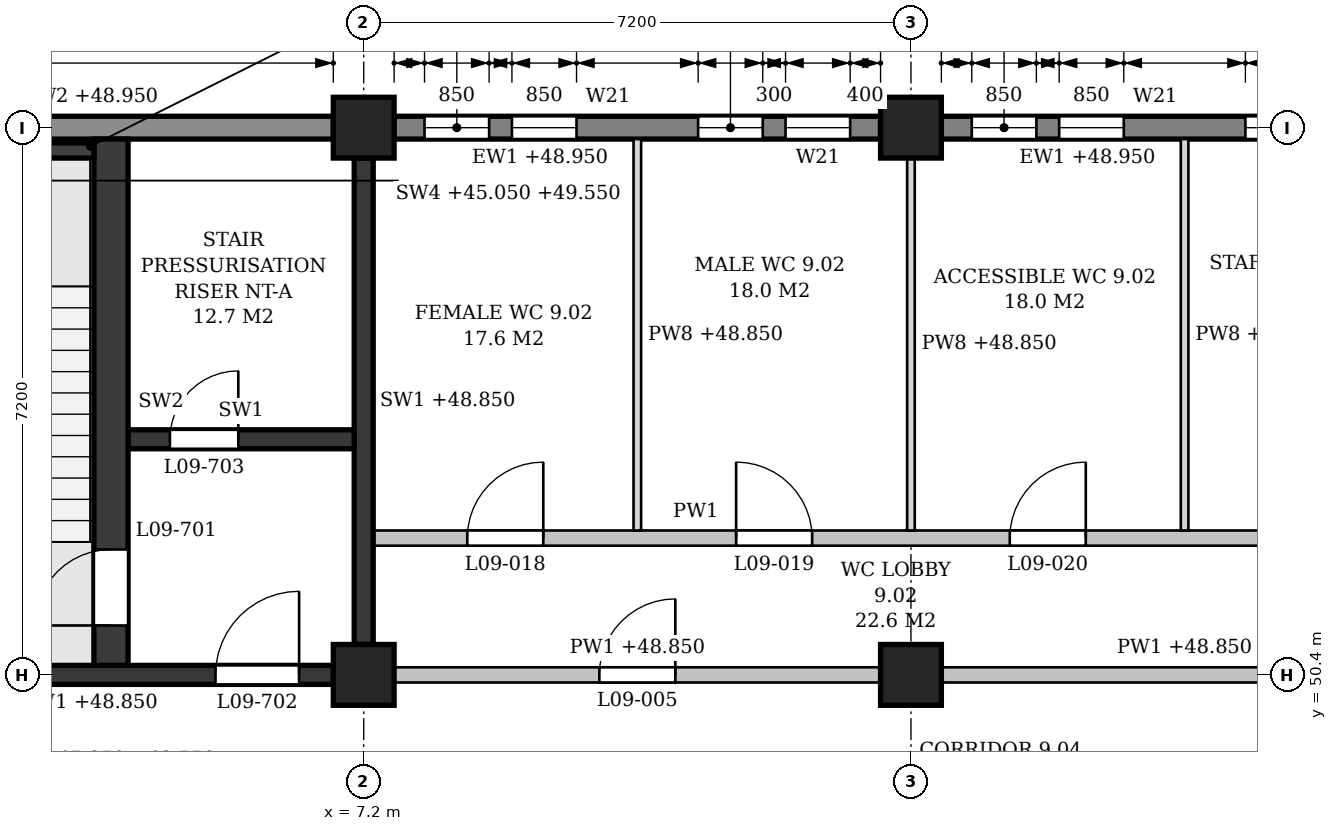
"""IFC4 building model, lengths in metres.
Left out: names, types, materials, properties, quantities, classifications, styles, units other than length and angle.
Written with IfcOpenShell. Run it as: python <this file> out.ifc"""

import sys

from ifc_helpers import new_model, si_unit, direction, frame, frame_2d, origin, origin_2d, place, context, subcontext, project, spatial, polyline, rectangle, outline, extrude, element, fill, save


model = new_model("IFC4")
c1 = context("Model", 3, precision=1e-05, world=origin(), true_north=direction((0.0, 1.0)))
c2 = subcontext(c1, "Body", "Model", "MODEL_VIEW")
j1 = project(units=[si_unit("LENGTHUNIT", "METRE"), si_unit("PLANEANGLEUNIT", "RADIAN")], contexts=[c1])
p1 = place(None, origin())
s1 = spatial("IfcSite", under=j1, at=p1, CompositionType="ELEMENT")
p2 = place(p1, origin())
s2 = spatial("IfcBuilding", under=s1, at=p2, CompositionType="ELEMENT")
p3 = place(p2, frame((0.0, 0.0, 45.3)))
s3 = spatial("IfcBuildingStorey", under=s2, at=p3, CompositionType="ELEMENT", Elevation=45.3)
for number, where, z_axis, x_axis in (
    (1, (7.2, 50.4, 0.0), (0.0, 0.0, 1.0), (1.0, 0.0, 0.0)),
    (2, (7.2, 57.6, 0.0), (0.0, 0.0, 1.0), (1.0, 0.0, 0.0)),
    (3, (14.4, 50.4, 0.0), (0.0, 0.0, 1.0), (1.0, 0.0, 0.0)),
    (4, (14.4, 57.6, 0.0), (0.0, 0.0, 1.0), (1.0, 0.0, 0.0)),
):
    element("IfcColumn", number, at=place(p3, frame(where, z_axis=z_axis, x_axis=x_axis)), inside=s3, PredefinedType="COLUMN", context=c2, shape_type="SweptSolid", body=[
        extrude(rectangle(XDim=0.8, YDim=0.8, at=origin_2d()), origin(), (0.0, 0.0, 1.0), 4.5),
    ])
p4 = place(p3, frame((21.2, 57.6, 0.0), z_axis=(0.0, 0.0, 1.0), x_axis=(-1.0, 0.0, 0.0)))
e5 = element("IfcWall", 5, at=p4, inside=s3, PredefinedType="STANDARD", context=c2, shape_type="SweptSolid", body=[
    extrude(rectangle(XDim=6.4, YDim=0.3, at=frame_2d((3.2, 0.0))), origin(), (0.0, 0.0, 1.0), 3.65),
])
p5 = place(p4, frame((0.4, 0.0, 0.9)))
e6 = element("IfcOpeningElement", 6, at=p5, cuts=e5, PredefinedType="OPENING", context=c2, shape_type="SweptSolid", body=[
    extrude(outline(polyline([(0.0, 0.0), (0.85, 0.0), (0.85, 2.25), (0.425, 2.7), (0.0, 2.25), (0.0, 0.0)])), frame((0.0, 0.16, 0.0), z_axis=(0.0, -1.0, 0.0), x_axis=(1.0, 0.0, 0.0)), (0.0, 0.0, 1.0), 0.32),
])
p6 = place(p4, frame((1.55, 0.0, 0.9)))
e7 = element("IfcOpeningElement", 7, at=p6, cuts=e5, PredefinedType="OPENING", context=c2, shape_type="SweptSolid", body=[
    extrude(outline(polyline([(0.0, 0.0), (0.85, 0.0), (0.85, 2.25), (0.425, 2.7), (0.0, 2.25), (0.0, 0.0)])), frame((0.0, 0.16, 0.0), z_axis=(0.0, -1.0, 0.0), x_axis=(1.0, 0.0, 0.0)), (0.0, 0.0, 1.0), 0.32),
])
p7 = place(p4, frame((4.0, 0.0, 0.9)))
e8 = element("IfcOpeningElement", 8, at=p7, cuts=e5, PredefinedType="OPENING", context=c2, shape_type="SweptSolid", body=[
    extrude(outline(polyline([(0.0, 0.0), (0.85, 0.0), (0.85, 2.25), (0.425, 2.7), (0.0, 2.25), (0.0, 0.0)])), frame((0.0, 0.16, 0.0), z_axis=(0.0, -1.0, 0.0), x_axis=(1.0, 0.0, 0.0)), (0.0, 0.0, 1.0), 0.32),
])
p8 = place(p4, frame((5.15, 0.0, 0.9)))
e9 = element("IfcOpeningElement", 9, at=p8, cuts=e5, PredefinedType="OPENING", context=c2, shape_type="SweptSolid", body=[
    extrude(outline(polyline([(0.0, 0.0), (0.85, 0.0), (0.85, 2.25), (0.425, 2.7), (0.0, 2.25), (0.0, 0.0)])), frame((0.0, 0.16, 0.0), z_axis=(0.0, -1.0, 0.0), x_axis=(1.0, 0.0, 0.0)), (0.0, 0.0, 1.0), 0.32),
])
p9 = place(p3, frame((14.0, 57.6, 0.0), z_axis=(0.0, 0.0, 1.0), x_axis=(-1.0, 0.0, 0.0)))
e10 = element("IfcWall", 10, at=p9, inside=s3, PredefinedType="STANDARD", context=c2, shape_type="SweptSolid", body=[
    extrude(rectangle(XDim=6.4, YDim=0.3, at=frame_2d((3.2, 0.0))), origin(), (0.0, 0.0, 1.0), 3.65),
])
p10 = place(p9, frame((0.4, 0.0, 0.9)))
e11 = element("IfcOpeningElement", 11, at=p10, cuts=e10, PredefinedType="OPENING", context=c2, shape_type="SweptSolid", body=[
    extrude(outline(polyline([(0.0, 0.0), (0.85, 0.0), (0.85, 2.25), (0.425, 2.7), (0.0, 2.25), (0.0, 0.0)])), frame((0.0, 0.16, 0.0), z_axis=(0.0, -1.0, 0.0), x_axis=(1.0, 0.0, 0.0)), (0.0, 0.0, 1.0), 0.32),
])
p11 = place(p9, frame((1.55, 0.0, 0.9)))
e12 = element("IfcOpeningElement", 12, at=p11, cuts=e10, PredefinedType="OPENING", context=c2, shape_type="SweptSolid", body=[
    extrude(outline(polyline([(0.0, 0.0), (0.85, 0.0), (0.85, 2.25), (0.425, 2.7), (0.0, 2.25), (0.0, 0.0)])), frame((0.0, 0.16, 0.0), z_axis=(0.0, -1.0, 0.0), x_axis=(1.0, 0.0, 0.0)), (0.0, 0.0, 1.0), 0.32),
])
p12 = place(p9, frame((4.0, 0.0, 0.9)))
e13 = element("IfcOpeningElement", 13, at=p12, cuts=e10, PredefinedType="OPENING", context=c2, shape_type="SweptSolid", body=[
    extrude(outline(polyline([(0.0, 0.0), (0.85, 0.0), (0.85, 2.25), (0.425, 2.7), (0.0, 2.25), (0.0, 0.0)])), frame((0.0, 0.16, 0.0), z_axis=(0.0, -1.0, 0.0), x_axis=(1.0, 0.0, 0.0)), (0.0, 0.0, 1.0), 0.32),
])
p13 = place(p9, frame((5.15, 0.0, 0.9)))
e14 = element("IfcOpeningElement", 14, at=p13, cuts=e10, PredefinedType="OPENING", context=c2, shape_type="SweptSolid", body=[
    extrude(outline(polyline([(0.0, 0.0), (0.85, 0.0), (0.85, 2.25), (0.425, 2.7), (0.0, 2.25), (0.0, 0.0)])), frame((0.0, 0.16, 0.0), z_axis=(0.0, -1.0, 0.0), x_axis=(1.0, 0.0, 0.0)), (0.0, 0.0, 1.0), 0.32),
])
p14 = place(p3, frame((6.8, 57.6, 0.0), z_axis=(0.0, 0.0, 1.0), x_axis=(-1.0, 0.0, 0.0)))
e15 = element("IfcWall", 15, at=p14, inside=s3, PredefinedType="STANDARD", context=c2, shape_type="SweptSolid", body=[
    extrude(rectangle(XDim=6.4, YDim=0.3, at=frame_2d((3.2, 0.0))), origin(), (0.0, 0.0, 1.0), 3.65),
])
p15 = place(p14, frame((4.55, 0.0, 0.9)))
e16 = element("IfcOpeningElement", 16, at=p15, cuts=e15, PredefinedType="OPENING", context=c2, shape_type="SweptSolid", body=[
    extrude(outline(polyline([(0.0, 0.0), (0.9, 0.0), (0.9, 2.25), (0.45, 2.7), (0.0, 2.25), (0.0, 0.0)])), frame((0.0, 0.16, 0.0), z_axis=(0.0, -1.0, 0.0), x_axis=(1.0, 0.0, 0.0)), (0.0, 0.0, 1.0), 0.32),
])
p16 = place(p3, frame((0.4, 50.4, 0.0), z_axis=(0.0, 0.0, 1.0), x_axis=(1.0, 0.0, 0.0)))
e17 = element("IfcWall", 17, at=p16, inside=s3, PredefinedType="SHEAR", context=c2, shape_type="SweptSolid", body=[
    extrude(rectangle(XDim=6.4, YDim=0.25, at=frame_2d((3.2, 0.0))), origin(), (0.0, 0.0, 1.0), 3.55),
])
p17 = place(p16, frame((4.85, 0.0, 0.0)))
e18 = element("IfcOpeningElement", 18, at=p17, cuts=e17, PredefinedType="OPENING", context=c2, shape_type="SweptSolid", body=[
    extrude(rectangle(XDim=1.1, YDim=2.1, at=frame_2d((0.55, 1.05))), frame((0.0, 0.135, 0.0), z_axis=(0.0, -1.0, 0.0), x_axis=(1.0, 0.0, 0.0)), (0.0, 0.0, 1.0), 0.27),
])
p18 = place(p3, frame((7.2, 50.8, 0.0), z_axis=(0.0, 0.0, 1.0), x_axis=(0.0, 1.0, 0.0)))
e19 = element("IfcWall", 19, at=p18, inside=s3, PredefinedType="SHEAR", context=c2, shape_type="SweptSolid", body=[
    extrude(rectangle(XDim=6.4, YDim=0.25, at=frame_2d((3.2, 0.0))), origin(), (0.0, 0.0, 1.0), 3.55),
])
p19 = place(p3, frame((2.25, 57.3, -0.25), z_axis=(0.0, 0.0, 1.0), x_axis=(1.0, 0.0, 0.0)))
e20 = element("IfcWall", 20, at=p19, inside=s3, PredefinedType="SHEAR", context=c2, shape_type="SweptSolid", body=[
    extrude(rectangle(XDim=1.4, YDim=0.2, at=frame_2d((0.7, 0.0))), origin(), (0.0, 0.0, 1.0), 4.5),
])
p20 = place(p3, frame((3.875, 50.525, 0.0), z_axis=(0.0, 0.0, 1.0), x_axis=(0.0, 1.0, 0.0)))
e21 = element("IfcWall", 21, at=p20, inside=s3, PredefinedType="SHEAR", context=c2, shape_type="SweptSolid", body=[
    extrude(rectangle(XDim=6.925, YDim=0.45, at=frame_2d((3.462, 0.0))), origin(), (0.0, 0.0, 1.0), 4.25),
])
p21 = place(p20, frame((0.525, 0.0, 0.0)))
e22 = element("IfcOpeningElement", 22, at=p21, cuts=e21, PredefinedType="OPENING", context=c2, shape_type="SweptSolid", body=[
    extrude(rectangle(XDim=1.0, YDim=2.1, at=frame_2d((0.5, 1.05))), frame((0.0, 0.235, 0.0), z_axis=(0.0, -1.0, 0.0), x_axis=(1.0, 0.0, 0.0)), (0.0, 0.0, 1.0), 0.47),
])
p22 = place(p3, frame((4.1, 53.5, 0.0), z_axis=(0.0, 0.0, 1.0), x_axis=(1.0, 0.0, 0.0)))
e23 = element("IfcWall", 23, at=p22, inside=s3, PredefinedType="SHEAR", context=c2, shape_type="SweptSolid", body=[
    extrude(rectangle(XDim=2.975, YDim=0.25, at=frame_2d((1.487, 0.0))), origin(), (0.0, 0.0, 1.0), 4.25),
])
p23 = place(p22, frame((0.55, 0.0, 0.0)))
e24 = element("IfcOpeningElement", 24, at=p23, cuts=e23, PredefinedType="OPENING", context=c2, shape_type="SweptSolid", body=[
    extrude(rectangle(XDim=0.9, YDim=2.1, at=frame_2d((0.45, 1.05))), frame((0.0, 0.135, 0.0), z_axis=(0.0, -1.0, 0.0), x_axis=(1.0, 0.0, 0.0)), (0.0, 0.0, 1.0), 0.27),
])
p24 = place(p3, frame((7.6, 50.4, 0.0), z_axis=(0.0, 0.0, 1.0), x_axis=(1.0, 0.0, 0.0)))
e25 = element("IfcWall", 25, at=p24, inside=s3, PredefinedType="PARTITIONING", context=c2, shape_type="SweptSolid", body=[
    extrude(rectangle(XDim=6.4, YDim=0.2, at=frame_2d((3.2, 0.0))), origin(), (0.0, 0.0, 1.0), 3.55),
])
p25 = place(p24, frame((2.7, 0.0, 0.0)))
e26 = element("IfcOpeningElement", 26, at=p25, cuts=e25, PredefinedType="OPENING", context=c2, shape_type="SweptSolid", body=[
    extrude(rectangle(XDim=1.0, YDim=2.1, at=frame_2d((0.5, 1.05))), frame((0.0, 0.11, 0.0), z_axis=(0.0, -1.0, 0.0), x_axis=(1.0, 0.0, 0.0)), (0.0, 0.0, 1.0), 0.22),
])
p26 = place(p3, frame((14.8, 50.4, 0.0), z_axis=(0.0, 0.0, 1.0), x_axis=(1.0, 0.0, 0.0)))
e27 = element("IfcWall", 27, at=p26, inside=s3, PredefinedType="PARTITIONING", context=c2, shape_type="SweptSolid", body=[
    extrude(rectangle(XDim=6.4, YDim=0.2, at=frame_2d((3.2, 0.0))), origin(), (0.0, 0.0, 1.0), 3.55),
])
p27 = place(p26, frame((4.3, 0.0, 0.0)))
e28 = element("IfcOpeningElement", 28, at=p27, cuts=e27, PredefinedType="OPENING", context=c2, shape_type="SweptSolid", body=[
    extrude(rectangle(XDim=1.0, YDim=2.1, at=frame_2d((0.5, 1.05))), frame((0.0, 0.11, 0.0), z_axis=(0.0, -1.0, 0.0), x_axis=(1.0, 0.0, 0.0)), (0.0, 0.0, 1.0), 0.22),
])
p28 = place(p3, frame((7.325, 52.2, 0.0), z_axis=(0.0, 0.0, 1.0), x_axis=(1.0, 0.0, 0.0)))
e29 = element("IfcWall", 29, at=p28, inside=s3, PredefinedType="PARTITIONING", context=c2, shape_type="SweptSolid", body=[
    extrude(outline(polyline([(0.0, 0.0), (14.15, 0.0), (14.15, 3.55), (14.05, 3.55), (14.05, 4.25), (7.3, 4.25), (7.3, 3.55), (6.85, 3.55), (6.85, 4.25), (0.1, 4.25), (0.1, 3.55), (0.0, 3.55), (0.0, 0.0)])), frame((0.0, 0.1, 0.0), z_axis=(0.0, -1.0, 0.0), x_axis=(1.0, 0.0, 0.0)), (0.0, 0.0, 1.0), 0.2),
])
p29 = place(p28, frame((1.238, 0.0, 0.0)))
e30 = element("IfcOpeningElement", 30, at=p29, cuts=e29, PredefinedType="OPENING", context=c2, shape_type="SweptSolid", body=[
    extrude(rectangle(XDim=1.0, YDim=2.1, at=frame_2d((0.5, 1.05))), frame((0.0, 0.11, 0.0), z_axis=(0.0, -1.0, 0.0), x_axis=(1.0, 0.0, 0.0)), (0.0, 0.0, 1.0), 0.22),
])
p30 = place(p28, frame((4.775, 0.0, 0.0)))
e31 = element("IfcOpeningElement", 31, at=p30, cuts=e29, PredefinedType="OPENING", context=c2, shape_type="SweptSolid", body=[
    extrude(rectangle(XDim=1.0, YDim=2.1, at=frame_2d((0.5, 1.05))), frame((0.0, 0.11, 0.0), z_axis=(0.0, -1.0, 0.0), x_axis=(1.0, 0.0, 0.0)), (0.0, 0.0, 1.0), 0.22),
])
p31 = place(p28, frame((8.375, 0.0, 0.0)))
e32 = element("IfcOpeningElement", 32, at=p31, cuts=e29, PredefinedType="OPENING", context=c2, shape_type="SweptSolid", body=[
    extrude(rectangle(XDim=1.0, YDim=2.1, at=frame_2d((0.5, 1.05))), frame((0.0, 0.11, 0.0), z_axis=(0.0, -1.0, 0.0), x_axis=(1.0, 0.0, 0.0)), (0.0, 0.0, 1.0), 0.22),
])
p32 = place(p28, frame((11.913, 0.0, 0.0)))
e33 = element("IfcOpeningElement", 33, at=p32, cuts=e29, PredefinedType="OPENING", context=c2, shape_type="SweptSolid", body=[
    extrude(rectangle(XDim=1.0, YDim=2.1, at=frame_2d((0.5, 1.05))), frame((0.0, 0.11, 0.0), z_axis=(0.0, -1.0, 0.0), x_axis=(1.0, 0.0, 0.0)), (0.0, 0.0, 1.0), 0.22),
])
p33 = place(p3, frame((10.8, 52.3, 0.0), z_axis=(0.0, 0.0, 1.0), x_axis=(0.0, 1.0, 0.0)))
e34 = element("IfcWall", 34, at=p33, inside=s3, PredefinedType="PARTITIONING", context=c2, shape_type="SweptSolid", body=[
    extrude(rectangle(XDim=5.15, YDim=0.1, at=frame_2d((2.575, 0.0))), origin(), (0.0, 0.0, 1.0), 3.55),
])
p34 = place(p3, frame((14.4, 52.3, 0.0), z_axis=(0.0, 0.0, 1.0), x_axis=(0.0, 1.0, 0.0)))
e35 = element("IfcWall", 35, at=p34, inside=s3, PredefinedType="PARTITIONING", context=c2, shape_type="SweptSolid", body=[
    extrude(rectangle(XDim=4.9, YDim=0.1, at=frame_2d((2.45, 0.0))), origin(), (0.0, 0.0, 1.0), 3.55),
])
p35 = place(p3, frame((18.0, 52.3, 0.0), z_axis=(0.0, 0.0, 1.0), x_axis=(0.0, 1.0, 0.0)))
e36 = element("IfcWall", 36, at=p35, inside=s3, PredefinedType="PARTITIONING", context=c2, shape_type="SweptSolid", body=[
    extrude(rectangle(XDim=5.15, YDim=0.1, at=frame_2d((2.575, 0.0))), origin(), (0.0, 0.0, 1.0), 3.55),
])
p36 = place(p6, origin())
e37 = element("IfcWindow", 37, at=p36, inside=s3, PartitioningType="SINGLE_PANEL", PredefinedType="WINDOW", context=c2, shape_type="SweptSolid", body=[
    extrude(outline(polyline([(0.0, 0.0), (0.85, 0.0), (0.85, 2.25), (0.425, 2.7), (0.0, 2.25), (0.0, 0.0)])), frame((0.0, 0.03, 0.0), z_axis=(0.0, -1.0, 0.0), x_axis=(1.0, 0.0, 0.0)), (0.0, 0.0, 1.0), 0.06),
])
fill(e7, e37)
p37 = place(p7, origin())
e38 = element("IfcWindow", 38, at=p37, inside=s3, PartitioningType="SINGLE_PANEL", PredefinedType="WINDOW", context=c2, shape_type="SweptSolid", body=[
    extrude(outline(polyline([(0.0, 0.0), (0.85, 0.0), (0.85, 2.25), (0.425, 2.7), (0.0, 2.25), (0.0, 0.0)])), frame((0.0, 0.03, 0.0), z_axis=(0.0, -1.0, 0.0), x_axis=(1.0, 0.0, 0.0)), (0.0, 0.0, 1.0), 0.06),
])
fill(e8, e38)
p38 = place(p8, origin())
e39 = element("IfcWindow", 39, at=p38, inside=s3, PartitioningType="SINGLE_PANEL", PredefinedType="WINDOW", context=c2, shape_type="SweptSolid", body=[
    extrude(outline(polyline([(0.0, 0.0), (0.85, 0.0), (0.85, 2.25), (0.425, 2.7), (0.0, 2.25), (0.0, 0.0)])), frame((0.0, 0.03, 0.0), z_axis=(0.0, -1.0, 0.0), x_axis=(1.0, 0.0, 0.0)), (0.0, 0.0, 1.0), 0.06),
])
fill(e9, e39)
p39 = place(p10, origin())
e40 = element("IfcWindow", 40, at=p39, inside=s3, PartitioningType="SINGLE_PANEL", PredefinedType="WINDOW", context=c2, shape_type="SweptSolid", body=[
    extrude(outline(polyline([(0.0, 0.0), (0.85, 0.0), (0.85, 2.25), (0.425, 2.7), (0.0, 2.25), (0.0, 0.0)])), frame((0.0, 0.03, 0.0), z_axis=(0.0, -1.0, 0.0), x_axis=(1.0, 0.0, 0.0)), (0.0, 0.0, 1.0), 0.06),
])
fill(e11, e40)
p40 = place(p11, origin())
e41 = element("IfcWindow", 41, at=p40, inside=s3, PartitioningType="SINGLE_PANEL", PredefinedType="WINDOW", context=c2, shape_type="SweptSolid", body=[
    extrude(outline(polyline([(0.0, 0.0), (0.85, 0.0), (0.85, 2.25), (0.425, 2.7), (0.0, 2.25), (0.0, 0.0)])), frame((0.0, 0.03, 0.0), z_axis=(0.0, -1.0, 0.0), x_axis=(1.0, 0.0, 0.0)), (0.0, 0.0, 1.0), 0.06),
])
fill(e12, e41)
p41 = place(p12, origin())
e42 = element("IfcWindow", 42, at=p41, inside=s3, PartitioningType="SINGLE_PANEL", PredefinedType="WINDOW", context=c2, shape_type="SweptSolid", body=[
    extrude(outline(polyline([(0.0, 0.0), (0.85, 0.0), (0.85, 2.25), (0.425, 2.7), (0.0, 2.25), (0.0, 0.0)])), frame((0.0, 0.03, 0.0), z_axis=(0.0, -1.0, 0.0), x_axis=(1.0, 0.0, 0.0)), (0.0, 0.0, 1.0), 0.06),
])
fill(e13, e42)
p42 = place(p13, origin())
e43 = element("IfcWindow", 43, at=p42, inside=s3, PartitioningType="SINGLE_PANEL", PredefinedType="WINDOW", context=c2, shape_type="SweptSolid", body=[
    extrude(outline(polyline([(0.0, 0.0), (0.85, 0.0), (0.85, 2.25), (0.425, 2.7), (0.0, 2.25), (0.0, 0.0)])), frame((0.0, 0.03, 0.0), z_axis=(0.0, -1.0, 0.0), x_axis=(1.0, 0.0, 0.0)), (0.0, 0.0, 1.0), 0.06),
])
fill(e14, e43)
p43 = place(p21, origin())
e44 = element("IfcDoor", 44, at=p43, inside=s3, OperationType="SINGLE_SWING_LEFT", PredefinedType="DOOR", context=c2, shape_type="SweptSolid", body=[
    extrude(rectangle(XDim=1.0, YDim=2.1, at=frame_2d((0.5, 1.05))), frame((0.0, 0.025, 0.0), z_axis=(0.0, -1.0, 0.0), x_axis=(1.0, 0.0, 0.0)), (0.0, 0.0, 1.0), 0.05),
])
fill(e22, e44)
p44 = place(p17, origin())
e45 = element("IfcDoor", 45, at=p44, inside=s3, OperationType="SINGLE_SWING_RIGHT", PredefinedType="DOOR", context=c2, shape_type="SweptSolid", body=[
    extrude(rectangle(XDim=1.1, YDim=2.1, at=frame_2d((0.55, 1.05))), frame((0.0, 0.025, 0.0), z_axis=(0.0, -1.0, 0.0), x_axis=(1.0, 0.0, 0.0)), (0.0, 0.0, 1.0), 0.05),
])
fill(e18, e45)
p45 = place(p23, origin())
e46 = element("IfcDoor", 46, at=p45, inside=s3, OperationType="SINGLE_SWING_RIGHT", PredefinedType="DOOR", context=c2, shape_type="SweptSolid", body=[
    extrude(rectangle(XDim=0.9, YDim=2.1, at=frame_2d((0.45, 1.05))), frame((0.0, 0.025, 0.0), z_axis=(0.0, -1.0, 0.0), x_axis=(1.0, 0.0, 0.0)), (0.0, 0.0, 1.0), 0.05),
])
fill(e24, e46)
p46 = place(p25, origin())
e47 = element("IfcDoor", 47, at=p46, inside=s3, OperationType="SINGLE_SWING_RIGHT", PredefinedType="DOOR", context=c2, shape_type="SweptSolid", body=[
    extrude(rectangle(XDim=1.0, YDim=2.1, at=frame_2d((0.5, 1.05))), frame((0.0, 0.025, 0.0), z_axis=(0.0, -1.0, 0.0), x_axis=(1.0, 0.0, 0.0)), (0.0, 0.0, 1.0), 0.05),
])
fill(e26, e47)
p47 = place(p29, origin())
e48 = element("IfcDoor", 48, at=p47, inside=s3, OperationType="SINGLE_SWING_RIGHT", PredefinedType="DOOR", context=c2, shape_type="SweptSolid", body=[
    extrude(rectangle(XDim=1.0, YDim=2.1, at=frame_2d((0.5, 1.05))), frame((0.0, 0.025, 0.0), z_axis=(0.0, -1.0, 0.0), x_axis=(1.0, 0.0, 0.0)), (0.0, 0.0, 1.0), 0.05),
])
fill(e30, e48)
p48 = place(p30, origin())
e49 = element("IfcDoor", 49, at=p48, inside=s3, OperationType="SINGLE_SWING_LEFT", PredefinedType="DOOR", context=c2, shape_type="SweptSolid", body=[
    extrude(rectangle(XDim=1.0, YDim=2.1, at=frame_2d((0.5, 1.05))), frame((0.0, 0.025, 0.0), z_axis=(0.0, -1.0, 0.0), x_axis=(1.0, 0.0, 0.0)), (0.0, 0.0, 1.0), 0.05),
])
fill(e31, e49)
p49 = place(p31, origin())
e50 = element("IfcDoor", 50, at=p49, inside=s3, OperationType="SINGLE_SWING_RIGHT", PredefinedType="DOOR", context=c2, shape_type="SweptSolid", body=[
    extrude(rectangle(XDim=1.0, YDim=2.1, at=frame_2d((0.5, 1.05))), frame((0.0, 0.025, 0.0), z_axis=(0.0, -1.0, 0.0), x_axis=(1.0, 0.0, 0.0)), (0.0, 0.0, 1.0), 0.05),
])
fill(e32, e50)
save(model, sys.argv[1])
